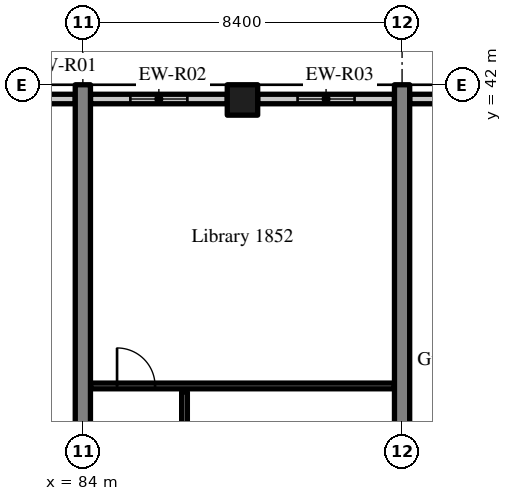
"""IFC4 building model, lengths in metres.
Left out: names, types, materials, properties, quantities, classifications, styles, units other than length and angle.
Written with IfcOpenShell. Run it as: python <this file> out.ifc"""

import sys

from ifc_helpers import new_model, si_unit, direction, frame, frame_2d, origin, origin_2d, place, context, subcontext, project, spatial, rectangle, extrude, source, transform, mapped, element, fill, save


model = new_model("IFC4")
c1 = context("Model", 3, precision=1e-05, world=origin(), true_north=direction((0.0, 1.0)))
c2 = subcontext(c1, "Body", "Model", "MODEL_VIEW")
j1 = project(units=[si_unit("LENGTHUNIT", "METRE"), si_unit("PLANEANGLEUNIT", "RADIAN")], contexts=[c1])
p1 = place(None, origin())
s1 = spatial("IfcSite", under=j1, at=p1, CompositionType="ELEMENT")
p2 = place(p1, origin())
s2 = spatial("IfcBuilding", under=s1, at=p2, CompositionType="ELEMENT")
p3 = place(p2, frame((0.0, 0.0, 77.2)))
s3 = spatial("IfcBuildingStorey", under=s2, at=p3, CompositionType="ELEMENT", Elevation=77.2)
m1 = source(origin(), c2, "Body", "SweptSolid", [
    extrude(rectangle(XDim=20.0, YDim=0.4, at=frame_2d((10.0, 0.0))), origin(), (0.0, 0.0, 1.0), 3.52),
])
for number, where, z_axis, x_axis in (
    (1, (84.0, 22.0, 0.0), (0.0, 0.0, 1.0), (0.0, 1.0, 0.0)),
    (2, (92.4, 22.0, 0.0), (0.0, 0.0, 1.0), (0.0, 1.0, 0.0)),
):
    element("IfcWall", number, at=place(p3, frame(where, z_axis=z_axis, x_axis=x_axis)), inside=s3, PredefinedType="SHEAR", context=c2, shape_type="MappedRepresentation", body=[
        mapped(m1, transform((0.0, 0.0, 0.0), scale=1.0)),
    ])
m2 = source(origin(), c2, "Body", "SweptSolid", [
    extrude(rectangle(XDim=0.8, YDim=0.8, at=origin_2d()), origin(), (0.0, 0.0, 1.0), 3.52),
])
p4 = place(p3, frame((88.2, 41.6, 0.0), z_axis=(0.0, 0.0, 1.0), x_axis=(1.0, 0.0, 0.0)))
e3 = element("IfcColumn", 3, at=p4, inside=s3, PredefinedType="COLUMN", context=c2, shape_type="MappedRepresentation", body=[
    mapped(m2, transform((0.0, 0.0, 0.0), scale=1.0)),
])
m3 = source(origin(), c2, "Body", "SweptSolid", [
    extrude(rectangle(XDim=1.658, YDim=0.25, at=frame_2d((0.829, 0.0))), origin(), (0.0, 0.0, 1.0), 2.82),
])
p5 = place(p3, frame((83.8, 41.625, 0.0), z_axis=(0.0, 0.0, 1.0), x_axis=(-1.0, 0.0, 0.0)))
e4 = element("IfcWall", 4, at=p5, inside=s3, PredefinedType="SOLIDWALL", context=c2, shape_type="MappedRepresentation", body=[
    mapped(m3, transform((0.0, 0.0, 0.0), scale=1.0)),
])
m4 = source(origin(), c2, "Body", "SweptSolid", [
    extrude(rectangle(XDim=3.6, YDim=0.25, at=frame_2d((1.8, 0.0))), origin(), (0.0, 0.0, 1.0), 2.82),
])
p6 = place(p3, frame((87.8, 41.625, 0.0), z_axis=(0.0, 0.0, 1.0), x_axis=(-1.0, 0.0, 0.0)))
e5 = element("IfcWall", 5, at=p6, inside=s3, PredefinedType="SOLIDWALL", context=c2, shape_type="MappedRepresentation", body=[
    mapped(m4, transform((0.0, 0.0, 0.0), scale=1.0)),
])
m5 = source(origin(), c2, "Body", "SweptSolid", [
    extrude(rectangle(XDim=1.5, YDim=1.5, at=frame_2d((0.75, 0.75))), frame((0.0, 0.135, 0.0), z_axis=(0.0, -1.0, 0.0), x_axis=(1.0, 0.0, 0.0)), (0.0, 0.0, 1.0), 0.27),
])
p7 = place(p6, frame((1.05, 0.0, 0.9)))
e6 = element("IfcOpeningElement", 6, at=p7, cuts=e5, PredefinedType="OPENING", context=c2, shape_type="MappedRepresentation", body=[
    mapped(m5, transform((0.0, 0.0, 0.0), scale=1.0)),
])
m6 = source(origin(), c2, "Body", "SweptSolid", [
    extrude(rectangle(XDim=3.6, YDim=0.25, at=frame_2d((1.8, 0.0))), origin(), (0.0, 0.0, 1.0), 2.82),
])
p8 = place(p3, frame((92.2, 41.625, 0.0), z_axis=(0.0, 0.0, 1.0), x_axis=(-1.0, 0.0, 0.0)))
e7 = element("IfcWall", 7, at=p8, inside=s3, PredefinedType="SOLIDWALL", context=c2, shape_type="MappedRepresentation", body=[
    mapped(m6, transform((0.0, 0.0, 0.0), scale=1.0)),
])
p9 = place(p8, frame((1.05, 0.0, 0.9)))
e8 = element("IfcOpeningElement", 8, at=p9, cuts=e7, PredefinedType="OPENING", context=c2, shape_type="MappedRepresentation", body=[
    mapped(m5, transform((0.0, 0.0, 0.0), scale=1.0)),
])
m7 = source(origin(), c2, "Body", "SweptSolid", [
    extrude(rectangle(XDim=4.045, YDim=0.25, at=frame_2d((2.022, 0.0))), origin(), (0.0, 0.0, 1.0), 2.82),
])
p10 = place(p3, frame((96.645, 41.625, 0.0), z_axis=(0.0, 0.0, 1.0), x_axis=(-1.0, 0.0, 0.0)))
e9 = element("IfcWall", 9, at=p10, inside=s3, PredefinedType="SOLIDWALL", context=c2, shape_type="MappedRepresentation", body=[
    mapped(m7, transform((0.0, 0.0, 0.0), scale=1.0)),
])
p11 = place(p10, frame((1.272, 0.0, 0.9)))
e10 = element("IfcOpeningElement", 10, at=p11, cuts=e9, PredefinedType="OPENING", context=c2, shape_type="MappedRepresentation", body=[
    mapped(m5, transform((0.0, 0.0, 0.0), scale=1.0)),
])
m8 = source(origin(), c2, "Body", "SweptSolid", [
    extrude(rectangle(XDim=3.85, YDim=0.15, at=frame_2d((1.925, 0.0))), origin(), (0.0, 0.0, 1.0), 3.52),
])
p12 = place(p3, frame((86.675, 30.075, 0.0), z_axis=(0.0, 0.0, 1.0), x_axis=(0.0, 1.0, 0.0)))
e11 = element("IfcWall", 11, at=p12, inside=s3, PredefinedType="PARTITIONING", context=c2, shape_type="MappedRepresentation", body=[
    mapped(m8, transform((0.0, 0.0, 0.0), scale=1.0)),
])
m9 = source(origin(), c2, "Body", "SweptSolid", [
    extrude(rectangle(XDim=1.0, YDim=2.1, at=frame_2d((0.5, 1.05))), frame((0.0, 0.085, 0.0), z_axis=(0.0, -1.0, 0.0), x_axis=(1.0, 0.0, 0.0)), (0.0, 0.0, 1.0), 0.17),
])
p13 = place(p12, frame((1.425, 0.0, 0.0)))
e12 = element("IfcOpeningElement", 12, at=p13, cuts=e11, PredefinedType="OPENING", context=c2, shape_type="MappedRepresentation", body=[
    mapped(m9, transform((0.0, 0.0, 0.0), scale=1.0)),
])
m10 = source(origin(), c2, "Body", "SweptSolid", [
    extrude(rectangle(XDim=8.0, YDim=0.15, at=frame_2d((4.0, 0.0))), origin(), (0.0, 0.0, 1.0), 3.52),
])
p14 = place(p3, frame((84.2, 34.075, 0.0), z_axis=(0.0, 0.0, 1.0), x_axis=(1.0, 0.0, 0.0)))
e13 = element("IfcWall", 13, at=p14, inside=s3, PredefinedType="PARTITIONING", context=c2, shape_type="MappedRepresentation", body=[
    mapped(m10, transform((0.0, 0.0, 0.0), scale=1.0)),
])
p15 = place(p14, frame((0.7, 0.0, 0.0)))
e14 = element("IfcOpeningElement", 14, at=p15, cuts=e13, PredefinedType="OPENING", context=c2, shape_type="MappedRepresentation", body=[
    mapped(m9, transform((0.0, 0.0, 0.0), scale=1.0)),
])
m11 = source(origin(), c2, "Body", "SweptSolid", [
    extrude(rectangle(XDim=1.5, YDim=1.5, at=frame_2d((0.75, 0.75))), frame((0.0, 0.03, 0.0), z_axis=(0.0, -1.0, 0.0), x_axis=(1.0, 0.0, 0.0)), (0.0, 0.0, 1.0), 0.06),
])
p16 = place(p7, origin())
e15 = element("IfcWindow", 15, at=p16, inside=s3, PartitioningType="SINGLE_PANEL", PredefinedType="WINDOW", context=c2, shape_type="MappedRepresentation", body=[
    mapped(m11, transform((0.0, 0.0, 0.0), scale=1.0)),
])
fill(e6, e15)
p17 = place(p9, origin())
e16 = element("IfcWindow", 16, at=p17, inside=s3, PartitioningType="SINGLE_PANEL", PredefinedType="WINDOW", context=c2, shape_type="MappedRepresentation", body=[
    mapped(m11, transform((0.0, 0.0, 0.0), scale=1.0)),
])
fill(e8, e16)
m12 = source(origin(), c2, "Body", "SweptSolid", [
    extrude(rectangle(XDim=1.0, YDim=2.1, at=frame_2d((0.5, 1.05))), frame((0.0, 0.025, 0.0), z_axis=(0.0, -1.0, 0.0), x_axis=(1.0, 0.0, 0.0)), (0.0, 0.0, 1.0), 0.05),
])
p18 = place(p15, origin())
e17 = element("IfcDoor", 17, at=p18, inside=s3, OperationType="SINGLE_SWING_LEFT", PredefinedType="DOOR", context=c2, shape_type="MappedRepresentation", body=[
    mapped(m12, transform((0.0, 0.0, 0.0), scale=1.0)),
])
fill(e14, e17)
save(model, sys.argv[1])
